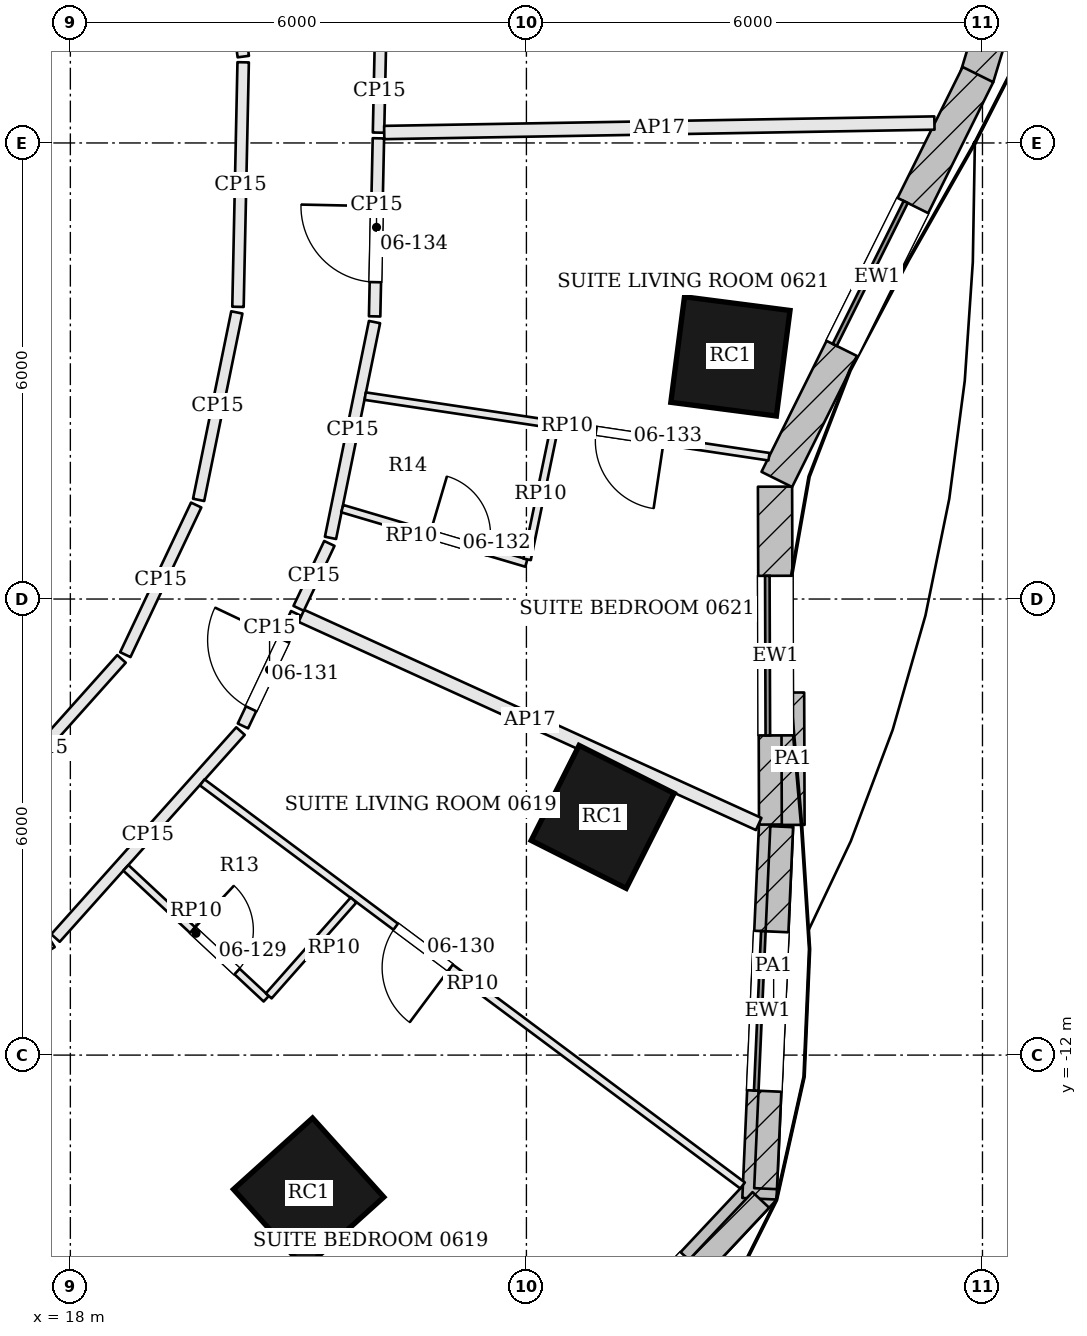
"""IFC4 building model, lengths in metres.
Left out: names, types, materials, properties, quantities, classifications, styles, units other than length and angle.
Written with IfcOpenShell. Run it as: python <this file> out.ifc"""

import sys

from ifc_helpers import new_model, si_unit, direction, frame, frame_2d, origin, origin_2d, place, context, subcontext, project, spatial, rectangle, extrude, element, fill, save


model = new_model("IFC4")
c1 = context("Model", 3, precision=1e-05, world=origin(), true_north=direction((0.0, 1.0)))
c2 = subcontext(c1, "Body", "Model", "MODEL_VIEW")
j1 = project(units=[si_unit("LENGTHUNIT", "METRE"), si_unit("PLANEANGLEUNIT", "RADIAN")], contexts=[c1])
p1 = place(None, origin())
s1 = spatial("IfcSite", under=j1, at=p1, CompositionType="ELEMENT")
p2 = place(p1, origin())
s2 = spatial("IfcBuilding", under=s1, at=p2, CompositionType="ELEMENT")
p3 = place(p2, frame((0.0, 0.0, 37.5)))
s3 = spatial("IfcBuildingStorey", under=s2, at=p3, CompositionType="ELEMENT", Elevation=37.5)
for number, where, z_axis, x_axis in (
    (1, (21.135, -13.817, 0.0), (0.0, 0.0, 1.0), (0.743, 0.67, 0.0)),
    (2, (25.003, -8.866, 0.0), (0.0, 0.0, 1.0), (0.45, 0.893, 0.0)),
    (3, (26.684, -2.808, 0.0), (0.0, 0.0, 1.0), (0.128, 0.992, 0.0)),
):
    element("IfcColumn", number, at=place(p3, frame(where, z_axis=z_axis, x_axis=x_axis)), inside=s3, PredefinedType="COLUMN", context=c2, shape_type="SweptSolid", body=[
        extrude(rectangle(XDim=1.4, YDim=1.4, at=origin_2d()), origin(), (0.0, 0.0, 1.0), 3.6),
    ])
p4 = place(p3, frame((29.927, 0.865, 0.0), z_axis=(0.0, 0.0, 1.0), x_axis=(0.289432445378, 0.957198443147, 0.0)))
e4 = element("IfcWall", 4, at=p4, inside=s3, PredefinedType="SOLIDWALL", context=c2, shape_type="SweptSolid", body=[
    extrude(rectangle(XDim=4.361, YDim=0.45, at=frame_2d((2.181, 0.0))), origin(), (0.0, 0.0, 1.0), 3.4),
])
p5 = place(p4, frame((1.131, 0.0, 0.9)))
e5 = element("IfcOpeningElement", 5, at=p5, cuts=e4, PredefinedType="OPENING", context=c2, shape_type="SweptSolid", body=[
    extrude(rectangle(XDim=2.1, YDim=2.0, at=frame_2d((1.05, 1.0))), frame((0.0, 0.235, 0.0), z_axis=(0.0, -1.0, 0.0), x_axis=(1.0, 0.0, 0.0)), (0.0, 0.0, 1.0), 0.47),
])
p6 = place(p3, frame((23.822, -17.273, 0.0), z_axis=(0.0, 0.0, 1.0), x_axis=(0.684173167988, 0.729319598122, 0.0)))
e6 = element("IfcWall", 6, at=p6, inside=s3, PredefinedType="SOLIDWALL", context=c2, shape_type="SweptSolid", body=[
    extrude(rectangle(XDim=4.829, YDim=0.45, at=frame_2d((2.415, 0.0))), origin(), (0.0, 0.0, 1.0), 3.4),
])
p7 = place(p6, frame((1.365, 0.0, 0.9)))
e7 = element("IfcOpeningElement", 7, at=p7, cuts=e6, PredefinedType="OPENING", context=c2, shape_type="SweptSolid", body=[
    extrude(rectangle(XDim=2.1, YDim=2.0, at=frame_2d((1.05, 1.0))), frame((0.0, 0.235, 0.0), z_axis=(0.0, -1.0, 0.0), x_axis=(1.0, 0.0, 0.0)), (0.0, 0.0, 1.0), 0.47),
])
p8 = place(p3, frame((27.065, -13.89, 0.0), z_axis=(0.0, 0.0, 1.0), x_axis=(0.044544250924, 0.99900741224, 0.0)))
e8 = element("IfcWall", 8, at=p8, inside=s3, PredefinedType="SOLIDWALL", context=c2, shape_type="SweptSolid", body=[
    extrude(rectangle(XDim=4.938, YDim=0.45, at=frame_2d((2.469, 0.0))), origin(), (0.0, 0.0, 1.0), 3.4),
])
p9 = place(p8, frame((1.419, 0.0, 0.9)))
e9 = element("IfcOpeningElement", 9, at=p9, cuts=e8, PredefinedType="OPENING", context=c2, shape_type="SweptSolid", body=[
    extrude(rectangle(XDim=2.1, YDim=2.0, at=frame_2d((1.05, 1.0))), frame((0.0, 0.235, 0.0), z_axis=(0.0, -1.0, 0.0), x_axis=(1.0, 0.0, 0.0)), (0.0, 0.0, 1.0), 0.47),
])
p10 = place(p3, frame((27.285, -8.967, 0.0), z_axis=(0.0, 0.0, 1.0), x_axis=(-0.003185571797, 0.999994926053, 0.0)))
e10 = element("IfcWall", 10, at=p10, inside=s3, PredefinedType="SOLIDWALL", context=c2, shape_type="SweptSolid", body=[
    extrude(rectangle(XDim=4.445, YDim=0.45, at=frame_2d((2.223, 0.0))), origin(), (0.0, 0.0, 1.0), 3.4),
])
p11 = place(p10, frame((1.173, 0.0, 0.9)))
e11 = element("IfcOpeningElement", 11, at=p11, cuts=e10, PredefinedType="OPENING", context=c2, shape_type="SweptSolid", body=[
    extrude(rectangle(XDim=2.1, YDim=2.0, at=frame_2d((1.05, 1.0))), frame((0.0, 0.235, 0.0), z_axis=(0.0, -1.0, 0.0), x_axis=(1.0, 0.0, 0.0)), (0.0, 0.0, 1.0), 0.47),
])
p12 = place(p3, frame((27.294, -4.427, 0.0), z_axis=(0.0, 0.0, 1.0), x_axis=(0.444913249375, 0.895573671191, 0.0)))
e12 = element("IfcWall", 12, at=p12, inside=s3, PredefinedType="SOLIDWALL", context=c2, shape_type="SweptSolid", body=[
    extrude(rectangle(XDim=5.947, YDim=0.45, at=frame_2d((2.974, 0.0))), origin(), (0.0, 0.0, 1.0), 3.4),
])
p13 = place(p12, frame((1.924, 0.0, 0.9)))
e13 = element("IfcOpeningElement", 13, at=p13, cuts=e12, PredefinedType="OPENING", context=c2, shape_type="SweptSolid", body=[
    extrude(rectangle(XDim=2.1, YDim=2.0, at=frame_2d((1.05, 1.0))), frame((0.0, 0.235, 0.0), z_axis=(0.0, -1.0, 0.0), x_axis=(1.0, 0.0, 0.0)), (0.0, 0.0, 1.0), 0.47),
])
p14 = place(p3, frame((24.481, -16.68, 3.6), z_axis=(0.0, 0.0, 1.0), x_axis=(0.684154586848, 0.729337028606, 0.0)))
e14 = element("IfcWall", 14, at=p14, inside=s3, PredefinedType="PARAPET", context=c2, shape_type="SweptSolid", body=[
    extrude(rectangle(XDim=3.804, YDim=0.3, at=frame_2d((1.902, 0.0))), origin(), (0.0, 0.0, 1.0), 1.1),
])
p15 = place(p3, frame((27.146, -13.757, 3.6), z_axis=(0.0, 0.0, 1.0), x_axis=(0.044503972994, 0.999009207359, 0.0)))
e15 = element("IfcWall", 15, at=p15, inside=s3, PredefinedType="PARAPET", context=c2, shape_type="SweptSolid", body=[
    extrude(rectangle(XDim=4.767, YDim=0.3, at=frame_2d((2.384, 0.0))), origin(), (0.0, 0.0, 1.0), 1.1),
])
p16 = place(p3, frame((27.51, -8.972, 3.6), z_axis=(0.0, 0.0, 1.0), x_axis=(-0.003223981002, 0.99999480296, 0.0)))
e16 = element("IfcWall", 16, at=p16, inside=s3, PredefinedType="PARAPET", context=c2, shape_type="SweptSolid", body=[
    extrude(rectangle(XDim=1.742, YDim=0.3, at=frame_2d((0.871, 0.0))), origin(), (0.0, 0.0, 1.0), 1.1),
])
p17 = place(p3, frame((22.054, 0.136, 0.0), z_axis=(0.0, 0.0, 1.0), x_axis=(0.021328480471, 0.999772522087, 0.0)))
e17 = element("IfcWall", 17, at=p17, inside=s3, PredefinedType="PARTITIONING", context=c2, shape_type="SweptSolid", body=[
    extrude(rectangle(XDim=1.099, YDim=0.15, at=frame_2d((0.549, 0.0))), origin(), (0.0, 0.0, 1.0), 2.68),
])
p18 = place(p3, frame((29.368, 0.262, 0.0), z_axis=(0.0, 0.0, 1.0), x_axis=(-0.999850929157, -0.017266136319, 0.0)))
e18 = element("IfcWall", 18, at=p18, inside=s3, PredefinedType="PARTITIONING", context=c2, shape_type="SweptSolid", body=[
    extrude(rectangle(XDim=7.24, YDim=0.175, at=frame_2d((3.62, 0.0))), origin(), (0.0, 0.0, 1.0), 2.68),
])
p19 = place(p3, frame((18.152, -17.639, 0.0), z_axis=(0.0, 0.0, 1.0), x_axis=(-0.47366383337, 0.880705724381, 0.0)))
e19 = element("IfcWall", 19, at=p19, inside=s3, PredefinedType="PARTITIONING", context=c2, shape_type="SweptSolid", body=[
    extrude(rectangle(XDim=6.178, YDim=0.175, at=frame_2d((3.089, 0.0))), origin(), (0.0, 0.0, 1.0), 2.68),
])
p20 = place(p3, frame((15.253, -12.091, 0.0), z_axis=(0.0, 0.0, 1.0), x_axis=(0.846020362576, 0.533150584832, 0.0)))
e20 = element("IfcWall", 20, at=p20, inside=s3, PredefinedType="PARTITIONING", context=c2, shape_type="SweptSolid", body=[
    extrude(rectangle(XDim=2.956, YDim=0.15, at=frame_2d((1.478, 0.0))), origin(), (0.0, 0.0, 1.0), 2.68),
])
p21 = place(p3, frame((17.804, -10.46, 0.0), z_axis=(0.0, 0.0, 1.0), x_axis=(0.666597463623, 0.745417883802, 0.0)))
e21 = element("IfcWall", 21, at=p21, inside=s3, PredefinedType="PARTITIONING", context=c2, shape_type="SweptSolid", body=[
    extrude(rectangle(XDim=3.652, YDim=0.15, at=frame_2d((1.826, 0.0))), origin(), (0.0, 0.0, 1.0), 2.68),
])
p22 = place(p3, frame((20.271, -7.67, 0.0), z_axis=(0.0, 0.0, 1.0), x_axis=(0.428079933012, 0.903740876, 0.0)))
e22 = element("IfcWall", 22, at=p22, inside=s3, PredefinedType="PARTITIONING", context=c2, shape_type="SweptSolid", body=[
    extrude(rectangle(XDim=1.637, YDim=0.15, at=frame_2d((0.818, 0.0))), origin(), (0.0, 0.0, 1.0), 2.68),
])
p23 = place(p22, frame((0.25, 0.0, 0.0)))
e23 = element("IfcOpeningElement", 23, at=p23, cuts=e22, PredefinedType="OPENING", context=c2, shape_type="SweptSolid", body=[
    extrude(rectangle(XDim=1.0, YDim=2.1, at=frame_2d((0.5, 1.05))), frame((0.0, 0.085, 0.0), z_axis=(0.0, -1.0, 0.0), x_axis=(1.0, 0.0, 0.0)), (0.0, 0.0, 1.0), 0.17),
])
p24 = place(p3, frame((27.056, -8.96, 0.0), z_axis=(0.0, 0.0, 1.0), x_axis=(-0.910155137501, 0.414267577396, 0.0)))
e24 = element("IfcWall", 24, at=p24, inside=s3, PredefinedType="PARTITIONING", context=c2, shape_type="SweptSolid", body=[
    extrude(rectangle(XDim=6.611, YDim=0.175, at=frame_2d((3.305, 0.0))), origin(), (0.0, 0.0, 1.0), 2.68),
])
p25 = place(p3, frame((21.003, -6.123, 0.0), z_axis=(0.0, 0.0, 1.0), x_axis=(0.427986355143, 0.903785195614, 0.0)))
e25 = element("IfcWall", 25, at=p25, inside=s3, PredefinedType="PARTITIONING", context=c2, shape_type="SweptSolid", body=[
    extrude(rectangle(XDim=0.945, YDim=0.15, at=frame_2d((0.472, 0.0))), origin(), (0.0, 0.0, 1.0), 2.68),
])
p26 = place(p3, frame((21.423, -5.195, 0.0), z_axis=(0.0, 0.0, 1.0), x_axis=(0.199793264012, 0.979838074202, 0.0)))
e26 = element("IfcWall", 26, at=p26, inside=s3, PredefinedType="PARTITIONING", context=c2, shape_type="SweptSolid", body=[
    extrude(rectangle(XDim=2.897, YDim=0.15, at=frame_2d((1.449, 0.0))), origin(), (0.0, 0.0, 1.0), 2.68),
])
p27 = place(p3, frame((22.003, -2.281, 0.0), z_axis=(0.0, 0.0, 1.0), x_axis=(0.021152119081, 0.999776268901, 0.0)))
e27 = element("IfcWall", 27, at=p27, inside=s3, PredefinedType="PARTITIONING", context=c2, shape_type="SweptSolid", body=[
    extrude(rectangle(XDim=2.343, YDim=0.15, at=frame_2d((1.171, 0.0))), origin(), (0.0, 0.0, 1.0), 2.68),
])
p28 = place(p27, frame((0.45, 0.0, 0.0)))
e28 = element("IfcOpeningElement", 28, at=p28, cuts=e27, PredefinedType="OPENING", context=c2, shape_type="SweptSolid", body=[
    extrude(rectangle(XDim=1.0, YDim=2.1, at=frame_2d((0.5, 1.05))), frame((0.0, 0.085, 0.0), z_axis=(0.0, -1.0, 0.0), x_axis=(1.0, 0.0, 0.0)), (0.0, 0.0, 1.0), 0.17),
])
p29 = place(p3, frame((19.915, 3.882, 0.0), z_axis=(0.0, 0.0, 1.0), x_axis=(0.129945947446, -0.991521079323, 0.0)))
e29 = element("IfcWall", 29, at=p29, inside=s3, PredefinedType="PARTITIONING", context=c2, shape_type="SweptSolid", body=[
    extrude(rectangle(XDim=2.769, YDim=0.15, at=frame_2d((1.385, 0.0))), origin(), (0.0, 0.0, 1.0), 2.68),
])
p30 = place(p3, frame((20.273, 1.061, 0.0), z_axis=(0.0, 0.0, 1.0), x_axis=(-0.021166906337, -0.99977595594, 0.0)))
e30 = element("IfcWall", 30, at=p30, inside=s3, PredefinedType="PARTITIONING", context=c2, shape_type="SweptSolid", body=[
    extrude(rectangle(XDim=3.218, YDim=0.15, at=frame_2d((1.609, 0.0))), origin(), (0.0, 0.0, 1.0), 2.68),
])
p31 = place(p3, frame((20.19, -2.229, 0.0), z_axis=(0.0, 0.0, 1.0), x_axis=(-0.199752828647, -0.97984631828, 0.0)))
e31 = element("IfcWall", 31, at=p31, inside=s3, PredefinedType="PARTITIONING", context=c2, shape_type="SweptSolid", body=[
    extrude(rectangle(XDim=2.517, YDim=0.15, at=frame_2d((1.258, 0.0))), origin(), (0.0, 0.0, 1.0), 2.68),
])
p32 = place(p3, frame((19.655, -4.763, 0.0), z_axis=(0.0, 0.0, 1.0), x_axis=(-0.427965880464, -0.903794891089, 0.0)))
e32 = element("IfcWall", 32, at=p32, inside=s3, PredefinedType="PARTITIONING", context=c2, shape_type="SweptSolid", body=[
    extrude(rectangle(XDim=2.178, YDim=0.15, at=frame_2d((1.089, 0.0))), origin(), (0.0, 0.0, 1.0), 2.68),
])
p33 = place(p3, frame((18.673, -6.788, 0.0), z_axis=(0.0, 0.0, 1.0), x_axis=(-0.666610670036, -0.745406073623, 0.0)))
e33 = element("IfcWall", 33, at=p33, inside=s3, PredefinedType="PARTITIONING", context=c2, shape_type="SweptSolid", body=[
    extrude(rectangle(XDim=3.139, YDim=0.15, at=frame_2d((1.569, 0.0))), origin(), (0.0, 0.0, 1.0), 2.68),
])
p34 = place(p3, frame((26.844, -13.716, 0.0), z_axis=(0.0, 0.0, 1.0), x_axis=(-0.801513651747, 0.597976476179, 0.0)))
e34 = element("IfcWall", 34, at=p34, inside=s3, PredefinedType="PARTITIONING", context=c2, shape_type="SweptSolid", body=[
    extrude(rectangle(XDim=8.869, YDim=0.1, at=frame_2d((4.435, 0.0))), origin(), (0.0, 0.0, 1.0), 2.884),
])
p35 = place(p34, frame((4.794, 0.0, 0.0)))
e35 = element("IfcOpeningElement", 35, at=p35, cuts=e34, PredefinedType="OPENING", context=c2, shape_type="SweptSolid", body=[
    extrude(rectangle(XDim=0.9, YDim=2.4, at=frame_2d((0.45, 1.2))), frame((0.0, 0.06, 0.0), z_axis=(0.0, -1.0, 0.0), x_axis=(1.0, 0.0, 0.0)), (0.0, 0.0, 1.0), 0.12),
])
p36 = place(p3, frame((18.73, -9.537, 0.0), z_axis=(0.0, 0.0, 1.0), x_axis=(0.731379942675, -0.68197021889, 0.0)))
e36 = element("IfcWall", 36, at=p36, inside=s3, PredefinedType="PARTITIONING", context=c2, shape_type="SweptSolid", body=[
    extrude(rectangle(XDim=2.525, YDim=0.1, at=frame_2d((1.262, 0.0))), origin(), (0.0, 0.0, 1.0), 2.884),
])
p37 = place(p36, frame((1.2, 0.0, 0.0)))
e37 = element("IfcOpeningElement", 37, at=p37, cuts=e36, PredefinedType="OPENING", context=c2, shape_type="SweptSolid", body=[
    extrude(rectangle(XDim=0.8, YDim=2.1, at=frame_2d((0.4, 1.05))), frame((0.0, 0.06, 0.0), z_axis=(0.0, -1.0, 0.0), x_axis=(1.0, 0.0, 0.0)), (0.0, 0.0, 1.0), 0.12),
])
p38 = place(p3, frame((20.61, -11.221, 0.0), z_axis=(0.0, 0.0, 1.0), x_axis=(0.66251758855, 0.749046356951, 0.0)))
e38 = element("IfcWall", 38, at=p38, inside=s3, PredefinedType="PARTITIONING", context=c2, shape_type="SweptSolid", body=[
    extrude(rectangle(XDim=1.684, YDim=0.1, at=frame_2d((0.842, 0.0))), origin(), (0.0, 0.0, 1.0), 2.884),
])
p39 = place(p3, frame((27.191, -4.128, 0.0), z_axis=(0.0, 0.0, 1.0), x_axis=(-0.988935352735, 0.148347120333, 0.0)))
e39 = element("IfcWall", 39, at=p39, inside=s3, PredefinedType="PARTITIONING", context=c2, shape_type="SweptSolid", body=[
    extrude(rectangle(XDim=5.372, YDim=0.1, at=frame_2d((2.686, 0.0))), origin(), (0.0, 0.0, 1.0), 2.884),
])
p40 = place(p39, frame((1.4, 0.0, 0.0)))
e40 = element("IfcOpeningElement", 40, at=p40, cuts=e39, PredefinedType="OPENING", context=c2, shape_type="SweptSolid", body=[
    extrude(rectangle(XDim=0.9, YDim=2.4, at=frame_2d((0.45, 1.2))), frame((0.0, 0.06, 0.0), z_axis=(0.0, -1.0, 0.0), x_axis=(1.0, 0.0, 0.0)), (0.0, 0.0, 1.0), 0.12),
])
p41 = place(p3, frame((21.577, -4.811, 0.0), z_axis=(0.0, 0.0, 1.0), x_axis=(0.958920921335, -0.283673521193, 0.0)))
e41 = element("IfcWall", 41, at=p41, inside=s3, PredefinedType="PARTITIONING", context=c2, shape_type="SweptSolid", body=[
    extrude(rectangle(XDim=2.525, YDim=0.1, at=frame_2d((1.263, 0.0))), origin(), (0.0, 0.0, 1.0), 2.884),
])
p42 = place(p41, frame((1.2, 0.0, 0.0)))
e42 = element("IfcOpeningElement", 42, at=p42, cuts=e41, PredefinedType="OPENING", context=c2, shape_type="SweptSolid", body=[
    extrude(rectangle(XDim=0.8, YDim=2.1, at=frame_2d((0.4, 1.05))), frame((0.0, 0.06, 0.0), z_axis=(0.0, -1.0, 0.0), x_axis=(1.0, 0.0, 0.0)), (0.0, 0.0, 1.0), 0.12),
])
p43 = place(p3, frame((24.009, -5.478, 0.0), z_axis=(0.0, 0.0, 1.0), x_axis=(0.202940438514, 0.979191083709, 0.0)))
e43 = element("IfcWall", 43, at=p43, inside=s3, PredefinedType="PARTITIONING", context=c2, shape_type="SweptSolid", body=[
    extrude(rectangle(XDim=1.76, YDim=0.1, at=frame_2d((0.88, 0.0))), origin(), (0.0, 0.0, 1.0), 2.884),
])
p44 = place(p7, origin())
e44 = element("IfcWindow", 44, at=p44, inside=s3, PartitioningType="SINGLE_PANEL", PredefinedType="WINDOW", context=c2, shape_type="SweptSolid", body=[
    extrude(rectangle(XDim=2.1, YDim=2.0, at=frame_2d((1.05, 1.0))), frame((0.0, 0.135, 0.0), z_axis=(0.0, -1.0, 0.0), x_axis=(1.0, 0.0, 0.0)), (0.0, 0.0, 1.0), 0.06),
])
fill(e7, e44)
p45 = place(p9, origin())
e45 = element("IfcWindow", 45, at=p45, inside=s3, PartitioningType="SINGLE_PANEL", PredefinedType="WINDOW", context=c2, shape_type="SweptSolid", body=[
    extrude(rectangle(XDim=2.1, YDim=2.0, at=frame_2d((1.05, 1.0))), frame((0.0, 0.135, 0.0), z_axis=(0.0, -1.0, 0.0), x_axis=(1.0, 0.0, 0.0)), (0.0, 0.0, 1.0), 0.06),
])
fill(e9, e45)
p46 = place(p11, origin())
e46 = element("IfcWindow", 46, at=p46, inside=s3, PartitioningType="SINGLE_PANEL", PredefinedType="WINDOW", context=c2, shape_type="SweptSolid", body=[
    extrude(rectangle(XDim=2.1, YDim=2.0, at=frame_2d((1.05, 1.0))), frame((0.0, 0.135, 0.0), z_axis=(0.0, -1.0, 0.0), x_axis=(1.0, 0.0, 0.0)), (0.0, 0.0, 1.0), 0.06),
])
fill(e11, e46)
p47 = place(p13, origin())
e47 = element("IfcWindow", 47, at=p47, inside=s3, PartitioningType="SINGLE_PANEL", PredefinedType="WINDOW", context=c2, shape_type="SweptSolid", body=[
    extrude(rectangle(XDim=2.1, YDim=2.0, at=frame_2d((1.05, 1.0))), frame((0.0, 0.135, 0.0), z_axis=(0.0, -1.0, 0.0), x_axis=(1.0, 0.0, 0.0)), (0.0, 0.0, 1.0), 0.06),
])
fill(e13, e47)
p48 = place(p37, origin())
e48 = element("IfcDoor", 48, at=p48, inside=s3, OperationType="SINGLE_SWING_LEFT", PredefinedType="DOOR", context=c2, shape_type="SweptSolid", body=[
    extrude(rectangle(XDim=0.8, YDim=2.1, at=frame_2d((0.4, 1.05))), frame((0.0, 0.025, 0.0), z_axis=(0.0, -1.0, 0.0), x_axis=(1.0, 0.0, 0.0)), (0.0, 0.0, 1.0), 0.05),
])
fill(e37, e48)
p49 = place(p35, origin())
e49 = element("IfcDoor", 49, at=p49, inside=s3, OperationType="SINGLE_SWING_LEFT", PredefinedType="DOOR", context=c2, shape_type="SweptSolid", body=[
    extrude(rectangle(XDim=0.9, YDim=2.4, at=frame_2d((0.45, 1.2))), frame((0.0, 0.025, 0.0), z_axis=(0.0, -1.0, 0.0), x_axis=(1.0, 0.0, 0.0)), (0.0, 0.0, 1.0), 0.05),
])
fill(e35, e49)
p50 = place(p23, origin())
e50 = element("IfcDoor", 50, at=p50, inside=s3, OperationType="SINGLE_SWING_RIGHT", PredefinedType="DOOR", context=c2, shape_type="SweptSolid", body=[
    extrude(rectangle(XDim=1.0, YDim=2.1, at=frame_2d((0.5, 1.05))), frame((0.0, 0.025, 0.0), z_axis=(0.0, -1.0, 0.0), x_axis=(1.0, 0.0, 0.0)), (0.0, 0.0, 1.0), 0.05),
])
fill(e23, e50)
p51 = place(p42, origin())
e51 = element("IfcDoor", 51, at=p51, inside=s3, OperationType="SINGLE_SWING_LEFT", PredefinedType="DOOR", context=c2, shape_type="SweptSolid", body=[
    extrude(rectangle(XDim=0.8, YDim=2.1, at=frame_2d((0.4, 1.05))), frame((0.0, 0.025, 0.0), z_axis=(0.0, -1.0, 0.0), x_axis=(1.0, 0.0, 0.0)), (0.0, 0.0, 1.0), 0.05),
])
fill(e42, e51)
p52 = place(p40, origin())
e52 = element("IfcDoor", 52, at=p52, inside=s3, OperationType="SINGLE_SWING_LEFT", PredefinedType="DOOR", context=c2, shape_type="SweptSolid", body=[
    extrude(rectangle(XDim=0.9, YDim=2.4, at=frame_2d((0.45, 1.2))), frame((0.0, 0.025, 0.0), z_axis=(0.0, -1.0, 0.0), x_axis=(1.0, 0.0, 0.0)), (0.0, 0.0, 1.0), 0.05),
])
fill(e40, e52)
p53 = place(p28, origin())
e53 = element("IfcDoor", 53, at=p53, inside=s3, OperationType="SINGLE_SWING_RIGHT", PredefinedType="DOOR", context=c2, shape_type="SweptSolid", body=[
    extrude(rectangle(XDim=1.0, YDim=2.1, at=frame_2d((0.5, 1.05))), frame((0.0, 0.025, 0.0), z_axis=(0.0, -1.0, 0.0), x_axis=(1.0, 0.0, 0.0)), (0.0, 0.0, 1.0), 0.05),
])
fill(e28, e53)
save(model, sys.argv[1])
